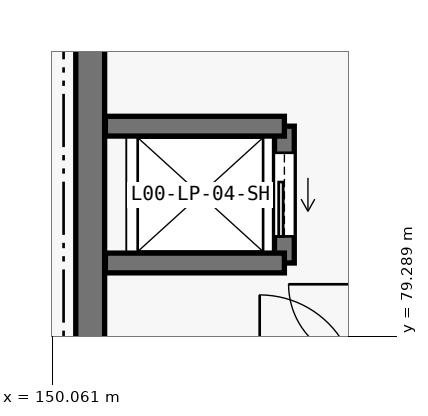
"""IFC4 building model, lengths in metres.
Left out: names, types, materials, properties, quantities, classifications, styles, units other than length and angle.
Written with IfcOpenShell. Run it as: python <this file> out.ifc"""

import sys

from ifc_helpers import new_model, si_unit, direction, frame, frame_2d, origin, place, context, subcontext, project, spatial, rectangle, extrude, element, fill, save


model = new_model("IFC4")
c1 = context("Model", 3, precision=1e-05, world=origin(), true_north=direction((0.0, 1.0)))
c2 = subcontext(c1, "Body", "Model", "MODEL_VIEW")
j1 = project(units=[si_unit("LENGTHUNIT", "METRE"), si_unit("PLANEANGLEUNIT", "RADIAN")], contexts=[c1])
p1 = place(None, origin())
s1 = spatial("IfcSite", under=j1, at=p1, CompositionType="ELEMENT")
p2 = place(p1, origin())
s2 = spatial("IfcBuilding", under=s1, at=p2, CompositionType="ELEMENT")
p3 = place(p2, origin())
s3 = spatial("IfcBuildingStorey", under=s2, at=p3, CompositionType="ELEMENT", Elevation=0.0)
p4 = place(p3, frame((150.56, 87.35, 0.0), z_axis=(0.0, 0.0, 1.0), x_axis=(0.0, -1.0, 0.0)))
e1 = element("IfcWall", 1, at=p4, inside=s3, PredefinedType="SHEAR", context=c2, shape_type="SweptSolid", body=[
    extrude(rectangle(XDim=8.8, YDim=0.38, at=frame_2d((4.4, 0.0))), origin(), (0.0, 0.0, 1.0), 6.0),
])
p5 = place(p3, frame((153.115, 80.25, 0.0), z_axis=(0.0, 0.0, 1.0), x_axis=(0.0, 1.0, 0.0)))
e2 = element("IfcWall", 2, at=p5, inside=s3, PredefinedType="SHEAR", context=c2, shape_type="SweptSolid", body=[
    extrude(rectangle(XDim=1.8, YDim=0.26, at=frame_2d((0.9, 0.0))), origin(), (0.0, 0.0, 1.0), 6.0),
])
p6 = place(p5, frame((0.35, 0.0, 0.0)))
e3 = element("IfcOpeningElement", 3, at=p6, cuts=e2, PredefinedType="OPENING", context=c2, shape_type="SweptSolid", body=[
    extrude(rectangle(XDim=1.1, YDim=2.15, at=frame_2d((0.55, 1.075))), frame((0.0, 0.14, 0.0), z_axis=(0.0, -1.0, 0.0), x_axis=(1.0, 0.0, 0.0)), (0.0, 0.0, 1.0), 0.28),
])
for number, where, z_axis, x_axis in (
    (4, (150.76, 80.25, 0.0), (0.0, 0.0, 1.0), (1.0, 0.0, 0.0)),
    (5, (150.76, 82.05, 0.0), (0.0, 0.0, 1.0), (1.0, 0.0, 0.0)),
):
    element("IfcWall", number, at=place(p3, frame(where, z_axis=z_axis, x_axis=x_axis)), inside=s3, PredefinedType="SHEAR", context=c2, shape_type="SweptSolid", body=[
        extrude(rectangle(XDim=2.355, YDim=0.26, at=frame_2d((1.177, 0.0))), origin(), (0.0, 0.0, 1.0), 6.0),
    ])
p7 = place(p6, origin())
e6 = element("IfcDoor", 6, at=p7, inside=s3, OperationType="SLIDING_TO_LEFT", PredefinedType="DOOR", context=c2, shape_type="SweptSolid", body=[
    extrude(rectangle(XDim=1.1, YDim=2.15, at=frame_2d((0.55, 1.075))), frame((0.0, 0.025, 0.0), z_axis=(0.0, -1.0, 0.0), x_axis=(1.0, 0.0, 0.0)), (0.0, 0.0, 1.0), 0.05),
])
fill(e3, e6)
save(model, sys.argv[1])
